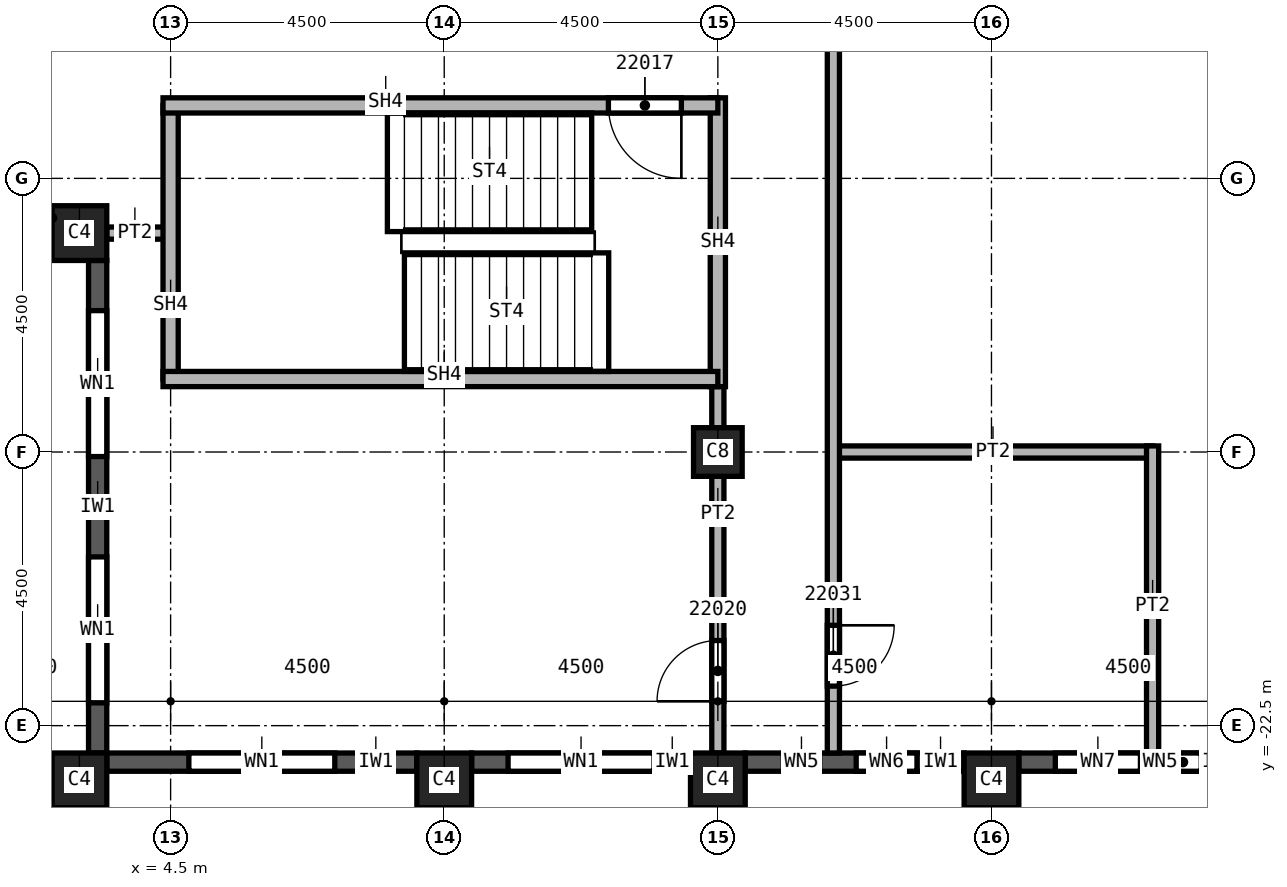
"""IFC4 building model, lengths in metres.
Left out: names, types, materials, properties, quantities, classifications, styles, units other than length and angle.
Written with IfcOpenShell. Run it as: python <this file> out.ifc"""

import sys

from ifc_helpers import new_model, si_unit, direction, frame, frame_2d, origin, origin_2d, place, context, subcontext, project, spatial, rectangle, extrude, element, fill, save


model = new_model("IFC4")
c1 = context("Model", 3, precision=1e-05, world=origin(), true_north=direction((0.0, 1.0)))
c2 = subcontext(c1, "Body", "Model", "MODEL_VIEW")
j1 = project(units=[si_unit("LENGTHUNIT", "METRE"), si_unit("PLANEANGLEUNIT", "RADIAN")], contexts=[c1])
p1 = place(None, origin())
s1 = spatial("IfcSite", under=j1, at=p1, CompositionType="ELEMENT")
p2 = place(p1, origin())
s2 = spatial("IfcBuilding", under=s1, at=p2, CompositionType="ELEMENT")
p3 = place(p2, frame((0.0, 0.0, 312.0)))
s3 = spatial("IfcBuildingStorey", under=s2, at=p3, CompositionType="ELEMENT", Elevation=312.0)
p4 = place(p3, frame((13.5, -18.0, 0.0), z_axis=(0.0, 0.0, 1.0), x_axis=(1.0, 0.0, 0.0)))
e1 = element("IfcColumn", 1, at=p4, inside=s3, PredefinedType="COLUMN", context=c2, shape_type="SweptSolid", body=[
    extrude(rectangle(XDim=0.8, YDim=0.8, at=origin_2d()), origin(), (0.0, 0.0, 1.0), 3.74),
])
for number, where, z_axis, x_axis in (
    (2, (3.0, -23.4, 0.0), (0.0, 0.0, 1.0), (1.0, 0.0, 0.0)),
    (3, (9.0, -23.4, 0.0), (0.0, 0.0, 1.0), (1.0, 0.0, 0.0)),
    (4, (13.5, -23.4, 0.0), (0.0, 0.0, 1.0), (1.0, 0.0, 0.0)),
    (5, (18.0, -23.4, 0.0), (0.0, 0.0, 1.0), (1.0, 0.0, 0.0)),
    (6, (3.0, -14.4, 0.0), (0.0, 0.0, 1.0), (1.0, 0.0, 0.0)),
):
    element("IfcColumn", number, at=place(p3, frame(where, z_axis=z_axis, x_axis=x_axis)), inside=s3, PredefinedType="COLUMN", context=c2, shape_type="SweptSolid", body=[
        extrude(rectangle(XDim=0.9, YDim=0.9, at=origin_2d()), origin(), (0.0, 0.0, 1.0), 3.74),
    ])
p5 = place(p3, frame((3.3, -14.85, 0.0), z_axis=(0.0, 0.0, 1.0), x_axis=(0.0, -1.0, 0.0)))
e7 = element("IfcWall", 7, at=p5, inside=s3, PredefinedType="SOLIDWALL", context=c2, shape_type="SweptSolid", body=[
    extrude(rectangle(XDim=8.1, YDim=0.3, at=frame_2d((4.05, 0.0))), origin(), (0.0, 0.0, 1.0), 3.14),
])
p6 = place(p5, frame((0.825, 0.0, 0.8)))
e8 = element("IfcOpeningElement", 8, at=p6, cuts=e7, PredefinedType="OPENING", context=c2, shape_type="SweptSolid", body=[
    extrude(rectangle(XDim=2.4, YDim=1.95, at=frame_2d((1.2, 0.975))), frame((0.0, 0.15, 0.0), z_axis=(0.0, -1.0, 0.0), x_axis=(1.0, 0.0, 0.0)), (0.0, 0.0, 1.0), 0.3),
])
p7 = place(p5, frame((4.875, 0.0, 0.8)))
e9 = element("IfcOpeningElement", 9, at=p7, cuts=e7, PredefinedType="OPENING", context=c2, shape_type="SweptSolid", body=[
    extrude(rectangle(XDim=2.4, YDim=1.95, at=frame_2d((1.2, 0.975))), frame((0.0, 0.15, 0.0), z_axis=(0.0, -1.0, 0.0), x_axis=(1.0, 0.0, 0.0)), (0.0, 0.0, 1.0), 0.3),
])
p8 = place(p3, frame((3.45, -23.1, 0.0), z_axis=(0.0, 0.0, 1.0), x_axis=(1.0, 0.0, 0.0)))
e10 = element("IfcWall", 10, at=p8, inside=s3, PredefinedType="SOLIDWALL", context=c2, shape_type="SweptSolid", body=[
    extrude(rectangle(XDim=5.1, YDim=0.3, at=frame_2d((2.55, 0.0))), origin(), (0.0, 0.0, 1.0), 3.14),
])
p9 = place(p8, frame((1.35, 0.0, 0.8)))
e11 = element("IfcOpeningElement", 11, at=p9, cuts=e10, PredefinedType="OPENING", context=c2, shape_type="SweptSolid", body=[
    extrude(rectangle(XDim=2.4, YDim=1.95, at=frame_2d((1.2, 0.975))), frame((0.0, 0.15, 0.0), z_axis=(0.0, -1.0, 0.0), x_axis=(1.0, 0.0, 0.0)), (0.0, 0.0, 1.0), 0.3),
])
p10 = place(p3, frame((9.45, -23.1, 0.0), z_axis=(0.0, 0.0, 1.0), x_axis=(1.0, 0.0, 0.0)))
e12 = element("IfcWall", 12, at=p10, inside=s3, PredefinedType="SOLIDWALL", context=c2, shape_type="SweptSolid", body=[
    extrude(rectangle(XDim=3.6, YDim=0.3, at=frame_2d((1.8, 0.0))), origin(), (0.0, 0.0, 1.0), 3.14),
])
p11 = place(p10, frame((0.6, 0.0, 0.8)))
e13 = element("IfcOpeningElement", 13, at=p11, cuts=e12, PredefinedType="OPENING", context=c2, shape_type="SweptSolid", body=[
    extrude(rectangle(XDim=2.4, YDim=1.95, at=frame_2d((1.2, 0.975))), frame((0.0, 0.15, 0.0), z_axis=(0.0, -1.0, 0.0), x_axis=(1.0, 0.0, 0.0)), (0.0, 0.0, 1.0), 0.3),
])
p12 = place(p3, frame((13.95, -23.1, 0.0), z_axis=(0.0, 0.0, 1.0), x_axis=(1.0, 0.0, 0.0)))
e14 = element("IfcWall", 14, at=p12, inside=s3, PredefinedType="SOLIDWALL", context=c2, shape_type="SweptSolid", body=[
    extrude(rectangle(XDim=3.6, YDim=0.3, at=frame_2d((1.8, 0.0))), origin(), (0.0, 0.0, 1.0), 3.14),
])
p13 = place(p12, frame((0.625, 0.0, 0.8)))
e15 = element("IfcOpeningElement", 15, at=p13, cuts=e14, PredefinedType="OPENING", context=c2, shape_type="SweptSolid", body=[
    extrude(rectangle(XDim=0.6, YDim=1.95, at=frame_2d((0.3, 0.975))), frame((0.0, 0.15, 0.0), z_axis=(0.0, -1.0, 0.0), x_axis=(1.0, 0.0, 0.0)), (0.0, 0.0, 1.0), 0.3),
])
p14 = place(p12, frame((1.825, 0.0, 0.8)))
e16 = element("IfcOpeningElement", 16, at=p14, cuts=e14, PredefinedType="OPENING", context=c2, shape_type="SweptSolid", body=[
    extrude(rectangle(XDim=1.0, YDim=1.95, at=frame_2d((0.5, 0.975))), frame((0.0, 0.15, 0.0), z_axis=(0.0, -1.0, 0.0), x_axis=(1.0, 0.0, 0.0)), (0.0, 0.0, 1.0), 0.3),
])
p15 = place(p3, frame((18.45, -23.1, 0.0), z_axis=(0.0, 0.0, 1.0), x_axis=(1.0, 0.0, 0.0)))
e17 = element("IfcWall", 17, at=p15, inside=s3, PredefinedType="SOLIDWALL", context=c2, shape_type="SweptSolid", body=[
    extrude(rectangle(XDim=3.6, YDim=0.3, at=frame_2d((1.8, 0.0))), origin(), (0.0, 0.0, 1.0), 3.14),
])
p16 = place(p15, frame((0.6, 0.0, 0.8)))
e18 = element("IfcOpeningElement", 18, at=p16, cuts=e17, PredefinedType="OPENING", context=c2, shape_type="SweptSolid", body=[
    extrude(rectangle(XDim=1.4, YDim=1.95, at=frame_2d((0.7, 0.975))), frame((0.0, 0.15, 0.0), z_axis=(0.0, -1.0, 0.0), x_axis=(1.0, 0.0, 0.0)), (0.0, 0.0, 1.0), 0.3),
])
p17 = place(p15, frame((2.4, 0.0, 0.8)))
e19 = element("IfcOpeningElement", 19, at=p17, cuts=e17, PredefinedType="OPENING", context=c2, shape_type="SweptSolid", body=[
    extrude(rectangle(XDim=0.6, YDim=1.95, at=frame_2d((0.3, 0.975))), frame((0.0, 0.15, 0.0), z_axis=(0.0, -1.0, 0.0), x_axis=(1.0, 0.0, 0.0)), (0.0, 0.0, 1.0), 0.3),
])
p18 = place(p3, frame((4.5, -14.4, 0.0), z_axis=(0.0, 0.0, 1.0), x_axis=(-1.0, 0.0, 0.0)))
e20 = element("IfcWall", 20, at=p18, inside=s3, PredefinedType="PARTITIONING", context=c2, shape_type="SweptSolid", body=[
    extrude(rectangle(XDim=1.05, YDim=0.2, at=frame_2d((0.525, 0.0))), origin(), (0.0, 0.0, 1.0), 3.74),
])
p19 = place(p3, frame((13.5, -22.95, 0.0), z_axis=(0.0, 0.0, 1.0), x_axis=(0.0, 1.0, 0.0)))
e21 = element("IfcWall", 21, at=p19, inside=s3, PredefinedType="PARTITIONING", context=c2, shape_type="SweptSolid", body=[
    extrude(rectangle(XDim=6.275, YDim=0.2, at=frame_2d((3.137, 0.0))), origin(), (0.0, 0.0, 1.0), 3.74),
])
p20 = place(p19, frame((0.85, 0.0, 0.0)))
e22 = element("IfcOpeningElement", 22, at=p20, cuts=e21, PredefinedType="OPENING", context=c2, shape_type="SweptSolid", body=[
    extrude(rectangle(XDim=1.0, YDim=2.1, at=frame_2d((0.5, 1.05))), frame((0.0, 0.1, 0.0), z_axis=(0.0, -1.0, 0.0), x_axis=(1.0, 0.0, 0.0)), (0.0, 0.0, 1.0), 0.2),
])
p21 = place(p3, frame((15.4, -18.0, 0.0), z_axis=(0.0, 0.0, 1.0), x_axis=(1.0, 0.0, 0.0)))
e23 = element("IfcWall", 23, at=p21, inside=s3, PredefinedType="PARTITIONING", context=c2, shape_type="SweptSolid", body=[
    extrude(rectangle(XDim=5.25, YDim=0.2, at=frame_2d((2.625, 0.0))), origin(), (0.0, 0.0, 1.0), 3.74),
])
p22 = place(p3, frame((15.4, 22.95, 0.0), z_axis=(0.0, 0.0, 1.0), x_axis=(0.0, -1.0, 0.0)))
e24 = element("IfcWall", 24, at=p22, inside=s3, PredefinedType="PARTITIONING", context=c2, shape_type="SweptSolid", body=[
    extrude(rectangle(XDim=45.9, YDim=0.2, at=frame_2d((22.95, 0.0))), origin(), (0.0, 0.0, 1.0), 3.74),
])
p23 = place(p22, frame((15.0, 0.0, 0.0)))
e25 = element("IfcOpeningElement", 25, at=p23, cuts=e24, PredefinedType="OPENING", context=c2, shape_type="SweptSolid", body=[
    extrude(rectangle(XDim=1.0, YDim=2.1, at=frame_2d((0.5, 1.05))), frame((0.0, 0.1, 0.0), z_axis=(0.0, -1.0, 0.0), x_axis=(1.0, 0.0, 0.0)), (0.0, 0.0, 1.0), 0.2),
])
p24 = place(p22, frame((8.05, 0.0, 0.0)))
e26 = element("IfcOpeningElement", 26, at=p24, cuts=e24, PredefinedType="OPENING", context=c2, shape_type="SweptSolid", body=[
    extrude(rectangle(XDim=1.0, YDim=2.1, at=frame_2d((0.5, 1.05))), frame((0.0, 0.1, 0.0), z_axis=(0.0, -1.0, 0.0), x_axis=(1.0, 0.0, 0.0)), (0.0, 0.0, 1.0), 0.2),
])
p25 = place(p22, frame((43.8, 0.0, 0.0)))
e27 = element("IfcOpeningElement", 27, at=p25, cuts=e24, PredefinedType="OPENING", context=c2, shape_type="SweptSolid", body=[
    extrude(rectangle(XDim=1.0, YDim=2.1, at=frame_2d((0.5, 1.05))), frame((0.0, 0.1, 0.0), z_axis=(0.0, -1.0, 0.0), x_axis=(1.0, 0.0, 0.0)), (0.0, 0.0, 1.0), 0.2),
])
p26 = place(p22, frame((30.3, 0.0, 0.0)))
e28 = element("IfcOpeningElement", 28, at=p26, cuts=e24, PredefinedType="OPENING", context=c2, shape_type="SweptSolid", body=[
    extrude(rectangle(XDim=1.0, YDim=2.1, at=frame_2d((0.5, 1.05))), frame((0.0, 0.1, 0.0), z_axis=(0.0, -1.0, 0.0), x_axis=(1.0, 0.0, 0.0)), (0.0, 0.0, 1.0), 0.2),
])
p27 = place(p3, frame((20.65, -17.9, 0.0), z_axis=(0.0, 0.0, 1.0), x_axis=(0.0, -1.0, 0.0)))
e29 = element("IfcWall", 29, at=p27, inside=s3, PredefinedType="PARTITIONING", context=c2, shape_type="SweptSolid", body=[
    extrude(rectangle(XDim=5.05, YDim=0.2, at=frame_2d((2.525, 0.0))), origin(), (0.0, 0.0, 1.0), 3.74),
])
p28 = place(p3, frame((4.5, -16.8, 0.0), z_axis=(0.0, 0.0, 1.0), x_axis=(0.0, 1.0, 0.0)))
e30 = element("IfcWall", 30, at=p28, inside=s3, PredefinedType="SOLIDWALL", context=c2, shape_type="SweptSolid", body=[
    extrude(rectangle(XDim=4.5, YDim=0.25, at=frame_2d((2.25, 0.0))), origin(), (0.0, 0.0, 1.0), 3.74),
])
p29 = place(p3, frame((13.5, -16.925, 0.0), z_axis=(0.0, 0.0, 1.0), x_axis=(0.0, 1.0, 0.0)))
e31 = element("IfcWall", 31, at=p29, inside=s3, PredefinedType="SOLIDWALL", context=c2, shape_type="SweptSolid", body=[
    extrude(rectangle(XDim=4.75, YDim=0.25, at=frame_2d((2.375, 0.0))), origin(), (0.0, 0.0, 1.0), 3.74),
])
p30 = place(p3, frame((13.5, -16.8, 0.0), z_axis=(0.0, 0.0, 1.0), x_axis=(-1.0, 0.0, 0.0)))
e32 = element("IfcWall", 32, at=p30, inside=s3, PredefinedType="SOLIDWALL", context=c2, shape_type="SweptSolid", body=[
    extrude(rectangle(XDim=9.125, YDim=0.25, at=frame_2d((4.562, 0.0))), origin(), (0.0, 0.0, 1.0), 3.74),
])
p31 = place(p3, frame((13.5, -12.3, 0.0), z_axis=(0.0, 0.0, 1.0), x_axis=(-1.0, 0.0, 0.0)))
e33 = element("IfcWall", 33, at=p31, inside=s3, PredefinedType="SOLIDWALL", context=c2, shape_type="SweptSolid", body=[
    extrude(rectangle(XDim=9.125, YDim=0.25, at=frame_2d((4.562, 0.0))), origin(), (0.0, 0.0, 1.0), 3.74),
])
p32 = place(p31, frame((0.6, 0.0, 0.0)))
e34 = element("IfcOpeningElement", 34, at=p32, cuts=e33, PredefinedType="OPENING", context=c2, shape_type="SweptSolid", body=[
    extrude(rectangle(XDim=1.2, YDim=2.1, at=frame_2d((0.6, 1.05))), frame((0.0, 0.125, 0.0), z_axis=(0.0, -1.0, 0.0), x_axis=(1.0, 0.0, 0.0)), (0.0, 0.0, 1.0), 0.25),
])
p33 = place(p6, origin())
e35 = element("IfcWindow", 35, at=p33, inside=s3, PartitioningType="SINGLE_PANEL", PredefinedType="WINDOW", context=c2, shape_type="SweptSolid", body=[
    extrude(rectangle(XDim=2.4, YDim=1.95, at=frame_2d((1.2, 0.975))), frame((0.0, 0.03, 0.0), z_axis=(0.0, -1.0, 0.0), x_axis=(1.0, 0.0, 0.0)), (0.0, 0.0, 1.0), 0.06),
])
fill(e8, e35)
p34 = place(p7, origin())
e36 = element("IfcWindow", 36, at=p34, inside=s3, PartitioningType="SINGLE_PANEL", PredefinedType="WINDOW", context=c2, shape_type="SweptSolid", body=[
    extrude(rectangle(XDim=2.4, YDim=1.95, at=frame_2d((1.2, 0.975))), frame((0.0, 0.03, 0.0), z_axis=(0.0, -1.0, 0.0), x_axis=(1.0, 0.0, 0.0)), (0.0, 0.0, 1.0), 0.06),
])
fill(e9, e36)
p35 = place(p9, origin())
e37 = element("IfcWindow", 37, at=p35, inside=s3, PartitioningType="SINGLE_PANEL", PredefinedType="WINDOW", context=c2, shape_type="SweptSolid", body=[
    extrude(rectangle(XDim=2.4, YDim=1.95, at=frame_2d((1.2, 0.975))), frame((0.0, 0.03, 0.0), z_axis=(0.0, -1.0, 0.0), x_axis=(1.0, 0.0, 0.0)), (0.0, 0.0, 1.0), 0.06),
])
fill(e11, e37)
p36 = place(p11, origin())
e38 = element("IfcWindow", 38, at=p36, inside=s3, PartitioningType="SINGLE_PANEL", PredefinedType="WINDOW", context=c2, shape_type="SweptSolid", body=[
    extrude(rectangle(XDim=2.4, YDim=1.95, at=frame_2d((1.2, 0.975))), frame((0.0, 0.03, 0.0), z_axis=(0.0, -1.0, 0.0), x_axis=(1.0, 0.0, 0.0)), (0.0, 0.0, 1.0), 0.06),
])
fill(e13, e38)
p37 = place(p32, origin())
e39 = element("IfcDoor", 39, at=p37, inside=s3, OperationType="SINGLE_SWING_RIGHT", PredefinedType="DOOR", context=c2, shape_type="SweptSolid", body=[
    extrude(rectangle(XDim=1.2, YDim=2.1, at=frame_2d((0.6, 1.05))), frame((0.0, 0.025, 0.0), z_axis=(0.0, -1.0, 0.0), x_axis=(1.0, 0.0, 0.0)), (0.0, 0.0, 1.0), 0.05),
])
fill(e34, e39)
p38 = place(p20, origin())
e40 = element("IfcDoor", 40, at=p38, inside=s3, OperationType="SINGLE_SWING_LEFT", PredefinedType="DOOR", context=c2, shape_type="SweptSolid", body=[
    extrude(rectangle(XDim=1.0, YDim=2.1, at=frame_2d((0.5, 1.05))), frame((0.0, 0.025, 0.0), z_axis=(0.0, -1.0, 0.0), x_axis=(1.0, 0.0, 0.0)), (0.0, 0.0, 1.0), 0.05),
])
fill(e22, e40)
p39 = place(p25, origin())
e41 = element("IfcDoor", 41, at=p39, inside=s3, OperationType="SINGLE_SWING_RIGHT", PredefinedType="DOOR", context=c2, shape_type="SweptSolid", body=[
    extrude(rectangle(XDim=1.0, YDim=2.1, at=frame_2d((0.5, 1.05))), frame((0.0, 0.025, 0.0), z_axis=(0.0, -1.0, 0.0), x_axis=(1.0, 0.0, 0.0)), (0.0, 0.0, 1.0), 0.05),
])
fill(e27, e41)
p40 = place(p13, origin())
e42 = element("IfcWindow", 42, at=p40, inside=s3, PartitioningType="SINGLE_PANEL", PredefinedType="WINDOW", context=c2, shape_type="SweptSolid", body=[
    extrude(rectangle(XDim=0.6, YDim=1.95, at=frame_2d((0.3, 0.975))), frame((0.0, 0.03, 0.0), z_axis=(0.0, -1.0, 0.0), x_axis=(1.0, 0.0, 0.0)), (0.0, 0.0, 1.0), 0.06),
])
fill(e15, e42)
p41 = place(p14, origin())
e43 = element("IfcWindow", 43, at=p41, inside=s3, PartitioningType="SINGLE_PANEL", PredefinedType="WINDOW", context=c2, shape_type="SweptSolid", body=[
    extrude(rectangle(XDim=1.0, YDim=1.95, at=frame_2d((0.5, 0.975))), frame((0.0, 0.03, 0.0), z_axis=(0.0, -1.0, 0.0), x_axis=(1.0, 0.0, 0.0)), (0.0, 0.0, 1.0), 0.06),
])
fill(e16, e43)
p42 = place(p16, origin())
e44 = element("IfcWindow", 44, at=p42, inside=s3, PartitioningType="SINGLE_PANEL", PredefinedType="WINDOW", context=c2, shape_type="SweptSolid", body=[
    extrude(rectangle(XDim=1.4, YDim=1.95, at=frame_2d((0.7, 0.975))), frame((0.0, 0.03, 0.0), z_axis=(0.0, -1.0, 0.0), x_axis=(1.0, 0.0, 0.0)), (0.0, 0.0, 1.0), 0.06),
])
fill(e18, e44)
p43 = place(p17, origin())
e45 = element("IfcWindow", 45, at=p43, inside=s3, PartitioningType="SINGLE_PANEL", PredefinedType="WINDOW", context=c2, shape_type="SweptSolid", body=[
    extrude(rectangle(XDim=0.6, YDim=1.95, at=frame_2d((0.3, 0.975))), frame((0.0, 0.03, 0.0), z_axis=(0.0, -1.0, 0.0), x_axis=(1.0, 0.0, 0.0)), (0.0, 0.0, 1.0), 0.06),
])
fill(e19, e45)
save(model, sys.argv[1])
